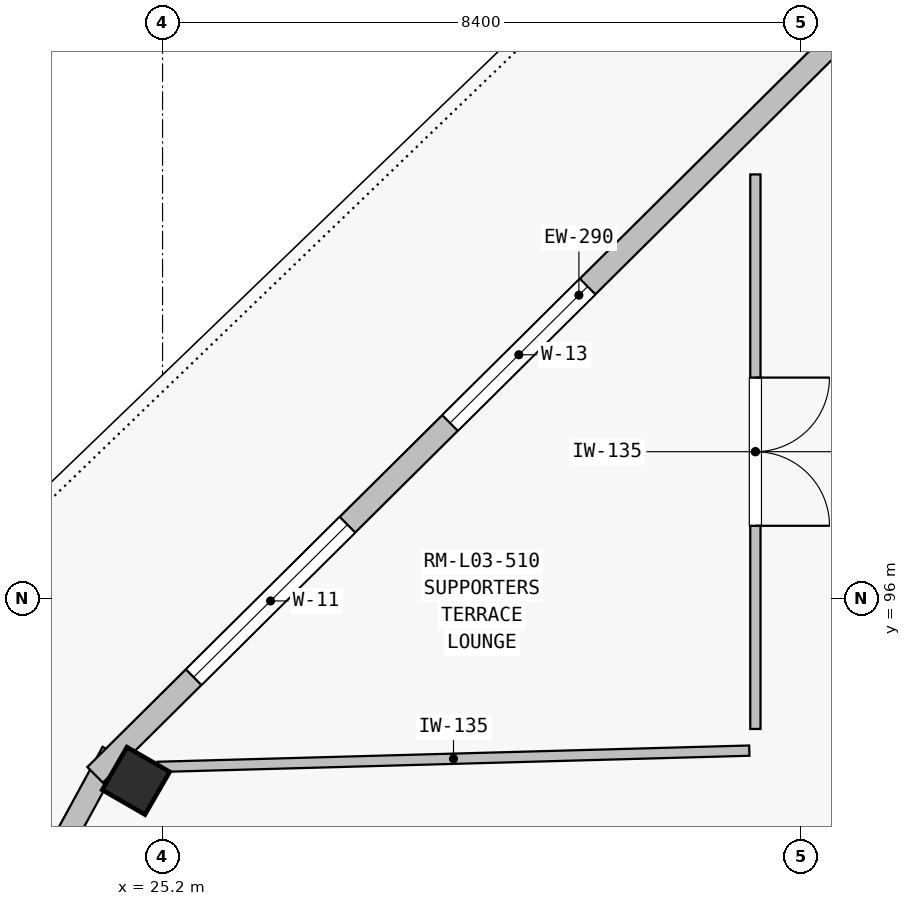
"""IFC4 building model, lengths in metres.
Left out: names, types, materials, properties, quantities, classifications, styles, units other than length and angle.
Written with IfcOpenShell. Run it as: python <this file> out.ifc"""

import sys

from ifc_helpers import new_model, si_unit, direction, frame, frame_2d, origin, origin_2d, place, context, subcontext, project, spatial, rectangle, extrude, element, fill, save


model = new_model("IFC4")
c1 = context("Model", 3, precision=1e-05, world=origin(), true_north=direction((0.0, 1.0)))
c2 = subcontext(c1, "Body", "Model", "MODEL_VIEW")
j1 = project(units=[si_unit("LENGTHUNIT", "METRE"), si_unit("PLANEANGLEUNIT", "RADIAN")], contexts=[c1])
p1 = place(None, origin())
s1 = spatial("IfcSite", under=j1, at=p1, CompositionType="ELEMENT")
p2 = place(p1, origin())
s2 = spatial("IfcBuilding", under=s1, at=p2, CompositionType="ELEMENT")
p3 = place(p2, frame((0.0, 0.0, 14.4)))
s3 = spatial("IfcBuildingStorey", under=s2, at=p3, CompositionType="ELEMENT", Elevation=14.4)
p4 = place(p3, frame((24.85, 93.6, 0.0), z_axis=(0.0, 0.0, 1.0), x_axis=(-0.866025403784, 0.5, 0.0)))
e1 = element("IfcColumn", 1, at=p4, inside=s3, PredefinedType="COLUMN", context=c2, shape_type="SweptSolid", body=[
    extrude(rectangle(XDim=0.65, YDim=0.65, at=origin_2d()), origin(), (0.0, 0.0, 1.0), 4.26),
])
p5 = place(p3, frame((19.532, 84.783, 0.0), z_axis=(0.0, 0.0, 1.0), x_axis=(0.478159273108, 0.878273140623, 0.0)))
e2 = element("IfcWall", 2, at=p5, inside=s3, PredefinedType="SOLIDWALL", context=c2, shape_type="SweptSolid", body=[
    extrude(rectangle(XDim=10.47, YDim=0.29, at=frame_2d((5.235, 0.0))), origin(), (0.0, 0.0, 1.0), 4.26),
])
p6 = place(p5, frame((1.75, 0.0, 0.9)))
e3 = element("IfcOpeningElement", 3, at=p6, cuts=e2, PredefinedType="OPENING", context=c2, shape_type="SweptSolid", body=[
    extrude(rectangle(XDim=3.0, YDim=1.6, at=frame_2d((1.5, 0.8))), frame((0.0, 0.155, 0.0), z_axis=(0.0, -1.0, 0.0), x_axis=(1.0, 0.0, 0.0)), (0.0, 0.0, 1.0), 0.31),
])
p7 = place(p3, frame((24.313, 93.679, 0.0), z_axis=(0.0, 0.0, 1.0), x_axis=(0.71011693404, 0.704083759214, 0.0)))
e4 = element("IfcWall", 4, at=p7, inside=s3, PredefinedType="SOLIDWALL", context=c2, shape_type="SweptSolid", body=[
    extrude(rectangle(XDim=17.927, YDim=0.29, at=frame_2d((8.963, 0.0))), origin(), (0.0, 0.0, 1.0), 4.26),
])
p8 = place(p7, frame((1.825, 0.0, 0.9)))
e5 = element("IfcOpeningElement", 5, at=p8, cuts=e4, PredefinedType="OPENING", context=c2, shape_type="SweptSolid", body=[
    extrude(rectangle(XDim=2.85, YDim=1.6, at=frame_2d((1.425, 0.8))), frame((0.0, 0.155, 0.0), z_axis=(0.0, -1.0, 0.0), x_axis=(1.0, 0.0, 0.0)), (0.0, 0.0, 1.0), 0.31),
])
p9 = place(p7, frame((6.575, 0.0, 0.9)))
e6 = element("IfcOpeningElement", 6, at=p9, cuts=e4, PredefinedType="OPENING", context=c2, shape_type="SweptSolid", body=[
    extrude(rectangle(XDim=2.55, YDim=1.55, at=frame_2d((1.275, 0.775))), frame((0.0, 0.155, 0.0), z_axis=(0.0, -1.0, 0.0), x_axis=(1.0, 0.0, 0.0)), (0.0, 0.0, 1.0), 0.31),
])
p10 = place(p3, frame((25.136, 93.784, 0.0), z_axis=(0.0, 0.0, 1.0), x_axis=(0.999621901922, 0.027496421541, 0.0)))
e7 = element("IfcWall", 7, at=p10, inside=s3, PredefinedType="PARTITIONING", context=c2, shape_type="SweptSolid", body=[
    extrude(rectangle(XDim=7.787, YDim=0.135, at=frame_2d((3.894, 0.0))), origin(), (0.0, 0.0, 1.0), 3.553),
])
p11 = place(p3, frame((33.0, 101.578, 0.0), z_axis=(0.0, 0.0, 1.0), x_axis=(0.0, -1.0, 0.0)))
e8 = element("IfcWall", 8, at=p11, inside=s3, PredefinedType="PARTITIONING", context=c2, shape_type="SweptSolid", body=[
    extrude(rectangle(XDim=7.295, YDim=0.135, at=frame_2d((3.648, 0.0))), origin(), (0.0, 0.0, 1.0), 3.553),
])
p12 = place(p11, frame((2.673, 0.0, 0.0)))
e9 = element("IfcOpeningElement", 9, at=p12, cuts=e8, PredefinedType="OPENING", context=c2, shape_type="SweptSolid", body=[
    extrude(rectangle(XDim=1.95, YDim=2.4, at=frame_2d((0.975, 1.2))), frame((0.0, 0.077, 0.0), z_axis=(0.0, -1.0, 0.0), x_axis=(1.0, 0.0, 0.0)), (0.0, 0.0, 1.0), 0.155),
])
p13 = place(p8, origin())
e10 = element("IfcWindow", 10, at=p13, inside=s3, PartitioningType="SINGLE_PANEL", PredefinedType="WINDOW", context=c2, shape_type="SweptSolid", body=[
    extrude(rectangle(XDim=2.85, YDim=1.6, at=frame_2d((1.425, 0.8))), frame((0.0, 0.03, 0.0), z_axis=(0.0, -1.0, 0.0), x_axis=(1.0, 0.0, 0.0)), (0.0, 0.0, 1.0), 0.06),
])
fill(e5, e10)
p14 = place(p9, origin())
e11 = element("IfcWindow", 11, at=p14, inside=s3, PartitioningType="SINGLE_PANEL", PredefinedType="WINDOW", context=c2, shape_type="SweptSolid", body=[
    extrude(rectangle(XDim=2.55, YDim=1.55, at=frame_2d((1.275, 0.775))), frame((0.0, 0.03, 0.0), z_axis=(0.0, -1.0, 0.0), x_axis=(1.0, 0.0, 0.0)), (0.0, 0.0, 1.0), 0.06),
])
fill(e6, e11)
p15 = place(p12, origin())
e12 = element("IfcDoor", 12, at=p15, inside=s3, OperationType="DOUBLE_DOOR_SINGLE_SWING", PredefinedType="DOOR", context=c2, shape_type="SweptSolid", body=[
    extrude(rectangle(XDim=1.95, YDim=2.4, at=frame_2d((0.975, 1.2))), frame((0.0, 0.025, 0.0), z_axis=(0.0, -1.0, 0.0), x_axis=(1.0, 0.0, 0.0)), (0.0, 0.0, 1.0), 0.05),
])
fill(e9, e12)
save(model, sys.argv[1])
